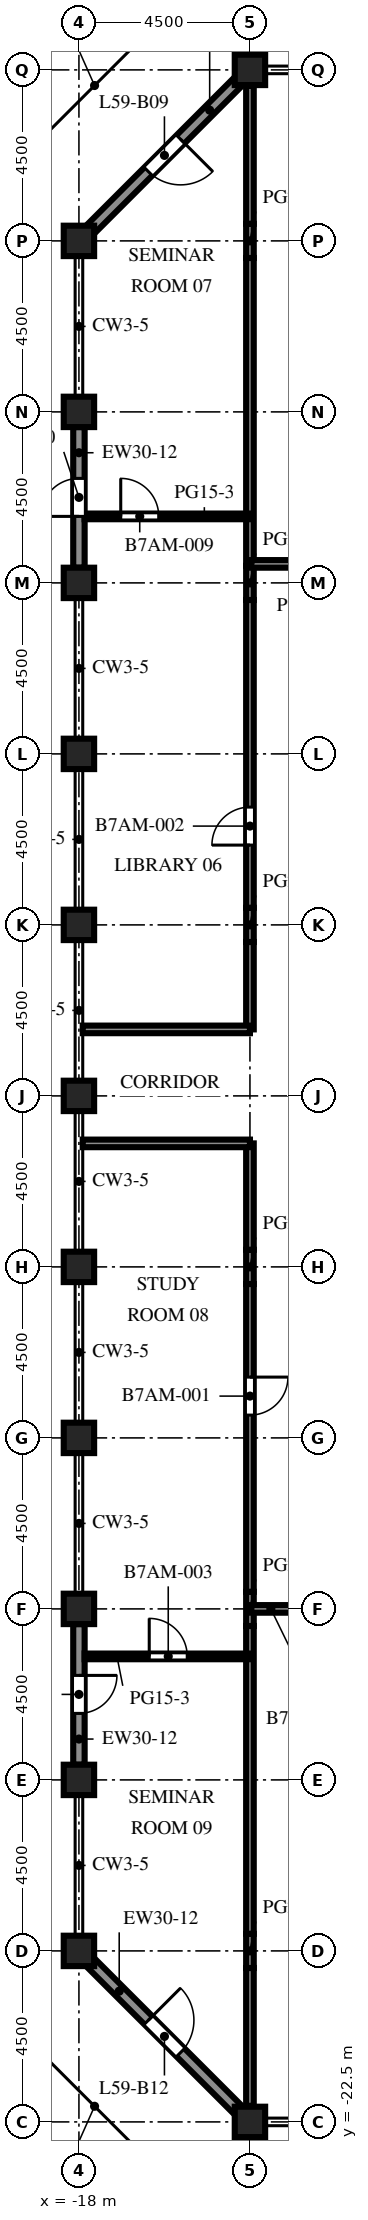
"""IFC4 building model, lengths in metres.
Left out: names, types, materials, properties, quantities, classifications, styles, units other than length and angle.
Written with IfcOpenShell. Run it as: python <this file> out.ifc"""

import sys

from ifc_helpers import new_model, si_unit, direction, frame, frame_2d, origin, origin_2d, place, context, subcontext, project, spatial, rectangle, extrude, element, fill, save


model = new_model("IFC4")
c1 = context("Model", 3, precision=1e-05, world=origin(), true_north=direction((0.0, 1.0)))
c2 = subcontext(c1, "Body", "Model", "MODEL_VIEW")
j1 = project(units=[si_unit("LENGTHUNIT", "METRE"), si_unit("PLANEANGLEUNIT", "RADIAN")], contexts=[c1])
p1 = place(None, origin())
s1 = spatial("IfcSite", under=j1, at=p1, CompositionType="ELEMENT")
p2 = place(p1, origin())
s2 = spatial("IfcBuilding", under=s1, at=p2, CompositionType="ELEMENT")
p3 = place(p2, frame((0.0, 0.0, 260.3)))
s3 = spatial("IfcBuildingStorey", under=s2, at=p3, CompositionType="ELEMENT", Elevation=260.3)
p4 = place(p3, frame((-18.0, -18.0, 0.0), z_axis=(0.0, 0.0, 1.0), x_axis=(1.0, 0.0, 0.0)))
e1 = element("IfcColumn", 1, at=p4, inside=s3, PredefinedType="COLUMN", context=c2, shape_type="SweptSolid", body=[
    extrude(rectangle(XDim=0.8, YDim=0.8, at=origin_2d()), origin(), (0.0, 0.0, 1.0), 5.55),
])
p5 = place(p3, frame((-18.0, -13.5, 0.0), z_axis=(0.0, 0.0, 1.0), x_axis=(1.0, 0.0, 0.0)))
e2 = element("IfcColumn", 2, at=p5, inside=s3, PredefinedType="COLUMN", context=c2, shape_type="SweptSolid", body=[
    extrude(rectangle(XDim=0.8, YDim=0.8, at=origin_2d()), origin(), (0.0, 0.0, 1.0), 6.0),
])
p6 = place(p3, frame((-18.0, -9.0, 0.0), z_axis=(0.0, 0.0, 1.0), x_axis=(1.0, 0.0, 0.0)))
e3 = element("IfcColumn", 3, at=p6, inside=s3, PredefinedType="COLUMN", context=c2, shape_type="SweptSolid", body=[
    extrude(rectangle(XDim=0.8, YDim=0.8, at=origin_2d()), origin(), (0.0, 0.0, 1.0), 5.55),
])
p7 = place(p3, frame((-18.0, -4.5, 0.0), z_axis=(0.0, 0.0, 1.0), x_axis=(1.0, 0.0, 0.0)))
e4 = element("IfcColumn", 4, at=p7, inside=s3, PredefinedType="COLUMN", context=c2, shape_type="SweptSolid", body=[
    extrude(rectangle(XDim=0.8, YDim=0.8, at=origin_2d()), origin(), (0.0, 0.0, 1.0), 6.0),
])
p8 = place(p3, frame((-18.0, 0.0, 0.0), z_axis=(0.0, 0.0, 1.0), x_axis=(1.0, 0.0, 0.0)))
e5 = element("IfcColumn", 5, at=p8, inside=s3, PredefinedType="COLUMN", context=c2, shape_type="SweptSolid", body=[
    extrude(rectangle(XDim=0.8, YDim=0.8, at=origin_2d()), origin(), (0.0, 0.0, 1.0), 5.55),
])
p9 = place(p3, frame((-18.0, 4.5, 0.0), z_axis=(0.0, 0.0, 1.0), x_axis=(1.0, 0.0, 0.0)))
e6 = element("IfcColumn", 6, at=p9, inside=s3, PredefinedType="COLUMN", context=c2, shape_type="SweptSolid", body=[
    extrude(rectangle(XDim=0.8, YDim=0.8, at=origin_2d()), origin(), (0.0, 0.0, 1.0), 6.0),
])
p10 = place(p3, frame((-18.0, 9.0, 0.0), z_axis=(0.0, 0.0, 1.0), x_axis=(1.0, 0.0, 0.0)))
e7 = element("IfcColumn", 7, at=p10, inside=s3, PredefinedType="COLUMN", context=c2, shape_type="SweptSolid", body=[
    extrude(rectangle(XDim=0.8, YDim=0.8, at=origin_2d()), origin(), (0.0, 0.0, 1.0), 5.55),
])
p11 = place(p3, frame((-18.0, 13.5, 0.0), z_axis=(0.0, 0.0, 1.0), x_axis=(1.0, 0.0, 0.0)))
e8 = element("IfcColumn", 8, at=p11, inside=s3, PredefinedType="COLUMN", context=c2, shape_type="SweptSolid", body=[
    extrude(rectangle(XDim=0.8, YDim=0.8, at=origin_2d()), origin(), (0.0, 0.0, 1.0), 6.0),
])
p12 = place(p3, frame((-18.0, 18.0, 0.0), z_axis=(0.0, 0.0, 1.0), x_axis=(1.0, 0.0, 0.0)))
e9 = element("IfcColumn", 9, at=p12, inside=s3, PredefinedType="COLUMN", context=c2, shape_type="SweptSolid", body=[
    extrude(rectangle(XDim=0.8, YDim=0.8, at=origin_2d()), origin(), (0.0, 0.0, 1.0), 5.55),
])
p13 = place(p3, frame((-18.0, 22.5, 0.0), z_axis=(0.0, 0.0, 1.0), x_axis=(1.0, 0.0, 0.0)))
e10 = element("IfcColumn", 10, at=p13, inside=s3, PredefinedType="COLUMN", context=c2, shape_type="SweptSolid", body=[
    extrude(rectangle(XDim=0.8, YDim=0.8, at=origin_2d()), origin(), (0.0, 0.0, 1.0), 6.0),
])
p14 = place(p3, frame((-18.0, 27.0, 0.0), z_axis=(0.0, 0.0, 1.0), x_axis=(1.0, 0.0, 0.0)))
e11 = element("IfcColumn", 11, at=p14, inside=s3, PredefinedType="COLUMN", context=c2, shape_type="SweptSolid", body=[
    extrude(rectangle(XDim=0.8, YDim=0.8, at=origin_2d()), origin(), (0.0, 0.0, 1.0), 5.55),
])
for number, where, z_axis, x_axis in (
    (12, (-13.5, -22.5, 0.0), (0.0, 0.0, 1.0), (1.0, 0.0, 0.0)),
    (13, (-13.5, 31.5, 0.0), (0.0, 0.0, 1.0), (1.0, 0.0, 0.0)),
):
    element("IfcColumn", number, at=place(p3, frame(where, z_axis=z_axis, x_axis=x_axis)), inside=s3, PredefinedType="COLUMN", context=c2, shape_type="SweptSolid", body=[
        extrude(rectangle(XDim=0.8, YDim=0.8, at=origin_2d()), origin(), (0.0, 0.0, 1.0), 6.0),
    ])
p15 = place(p3, frame((-17.706, 27.294, 0.0), z_axis=(0.0, 0.0, 1.0), x_axis=(0.707106781187, 0.707106781187, 0.0)))
e14 = element("IfcWall", 14, at=p15, inside=s3, PredefinedType="SOLIDWALL", context=c2, shape_type="SweptSolid", body=[
    extrude(rectangle(XDim=5.532, YDim=0.3, at=frame_2d((2.766, 0.0))), origin(), (0.0, 0.0, 1.0), 3.75),
])
p16 = place(p15, frame((2.166, 0.0, 0.0)))
e15 = element("IfcOpeningElement", 15, at=p16, cuts=e14, PredefinedType="OPENING", context=c2, shape_type="SweptSolid", body=[
    extrude(rectangle(XDim=1.2, YDim=2.2, at=frame_2d((0.6, 1.1))), frame((0.0, 0.16, 0.0), z_axis=(0.0, -1.0, 0.0), x_axis=(1.0, 0.0, 0.0)), (0.0, 0.0, 1.0), 0.32),
])
p17 = place(p3, frame((-18.0, 18.4, 0.0), z_axis=(0.0, 0.0, 1.0), x_axis=(0.0, 1.0, 0.0)))
e16 = element("IfcWall", 16, at=p17, inside=s3, PredefinedType="SOLIDWALL", context=c2, shape_type="SweptSolid", body=[
    extrude(rectangle(XDim=3.7, YDim=0.3, at=frame_2d((1.85, 0.0))), origin(), (0.0, 0.0, 1.0), 3.75),
])
p18 = place(p17, frame((1.35, 0.0, 0.0)))
e17 = element("IfcOpeningElement", 17, at=p18, cuts=e16, PredefinedType="OPENING", context=c2, shape_type="SweptSolid", body=[
    extrude(rectangle(XDim=1.0, YDim=2.2, at=frame_2d((0.5, 1.1))), frame((0.0, 0.16, 0.0), z_axis=(0.0, -1.0, 0.0), x_axis=(1.0, 0.0, 0.0)), (0.0, 0.0, 1.0), 0.32),
])
p19 = place(p3, frame((-18.0, -13.1, 0.0), z_axis=(0.0, 0.0, 1.0), x_axis=(0.0, 1.0, 0.0)))
e18 = element("IfcWall", 18, at=p19, inside=s3, PredefinedType="SOLIDWALL", context=c2, shape_type="SweptSolid", body=[
    extrude(rectangle(XDim=3.7, YDim=0.3, at=frame_2d((1.85, 0.0))), origin(), (0.0, 0.0, 1.0), 3.75),
])
p20 = place(p19, frame((1.35, 0.0, 0.0)))
e19 = element("IfcOpeningElement", 19, at=p20, cuts=e18, PredefinedType="OPENING", context=c2, shape_type="SweptSolid", body=[
    extrude(rectangle(XDim=1.0, YDim=2.2, at=frame_2d((0.5, 1.1))), frame((0.0, 0.16, 0.0), z_axis=(0.0, -1.0, 0.0), x_axis=(1.0, 0.0, 0.0)), (0.0, 0.0, 1.0), 0.32),
])
p21 = place(p3, frame((-13.794, -22.206, 0.0), z_axis=(0.0, 0.0, 1.0), x_axis=(-0.707106781187, 0.707106781187, 0.0)))
e20 = element("IfcWall", 20, at=p21, inside=s3, PredefinedType="SOLIDWALL", context=c2, shape_type="SweptSolid", body=[
    extrude(rectangle(XDim=5.532, YDim=0.3, at=frame_2d((2.766, 0.0))), origin(), (0.0, 0.0, 1.0), 3.75),
])
p22 = place(p21, frame((2.166, 0.0, 0.0)))
e21 = element("IfcOpeningElement", 21, at=p22, cuts=e20, PredefinedType="OPENING", context=c2, shape_type="SweptSolid", body=[
    extrude(rectangle(XDim=1.2, YDim=2.2, at=frame_2d((0.6, 1.1))), frame((0.0, 0.16, 0.0), z_axis=(0.0, -1.0, 0.0), x_axis=(1.0, 0.0, 0.0)), (0.0, 0.0, 1.0), 0.32),
])
p23 = place(p3, frame((-13.5, -22.077, 0.0), z_axis=(0.0, 0.0, 1.0), x_axis=(0.0, 1.0, 0.0)))
e22 = element("IfcWall", 22, at=p23, inside=s3, PredefinedType="PARTITIONING", context=c2, shape_type="SweptSolid", body=[
    extrude(rectangle(XDim=3.627, YDim=0.2, at=frame_2d((1.813, 0.0))), origin(), (0.0, 0.0, 1.0), 5.55),
])
p24 = place(p3, frame((-13.5, -18.45, 0.0), z_axis=(0.0, 0.0, 1.0), x_axis=(0.0, 1.0, 0.0)))
e23 = element("IfcWall", 23, at=p24, inside=s3, PredefinedType="PARTITIONING", context=c2, shape_type="SweptSolid", body=[
    extrude(rectangle(XDim=0.9, YDim=0.2, at=frame_2d((0.45, 0.0))), origin(), (0.0, 0.0, 1.0), 3.72),
])
p25 = place(p3, frame((-13.5, -17.55, 0.0), z_axis=(0.0, 0.0, 1.0), x_axis=(0.0, 1.0, 0.0)))
e24 = element("IfcWall", 24, at=p25, inside=s3, PredefinedType="PARTITIONING", context=c2, shape_type="SweptSolid", body=[
    extrude(rectangle(XDim=8.1, YDim=0.2, at=frame_2d((4.05, 0.0))), origin(), (0.0, 0.0, 1.0), 5.55),
])
p26 = place(p3, frame((-13.5, -9.45, 0.0), z_axis=(0.0, 0.0, 1.0), x_axis=(0.0, 1.0, 0.0)))
e25 = element("IfcWall", 25, at=p26, inside=s3, PredefinedType="PARTITIONING", context=c2, shape_type="SweptSolid", body=[
    extrude(rectangle(XDim=0.9, YDim=0.2, at=frame_2d((0.45, 0.0))), origin(), (0.0, 0.0, 1.0), 3.72),
])
p27 = place(p3, frame((-13.5, -8.55, 0.0), z_axis=(0.0, 0.0, 1.0), x_axis=(0.0, 1.0, 0.0)))
e26 = element("IfcWall", 26, at=p27, inside=s3, PredefinedType="PARTITIONING", context=c2, shape_type="SweptSolid", body=[
    extrude(rectangle(XDim=8.1, YDim=0.2, at=frame_2d((4.05, 0.0))), origin(), (0.0, 0.0, 1.0), 5.55),
])
p28 = place(p27, frame((4.65, 0.0, 0.0)))
e27 = element("IfcOpeningElement", 27, at=p28, cuts=e26, PredefinedType="OPENING", context=c2, shape_type="SweptSolid", body=[
    extrude(rectangle(XDim=1.0, YDim=2.1, at=frame_2d((0.5, 1.05))), frame((0.0, 0.11, 0.0), z_axis=(0.0, -1.0, 0.0), x_axis=(1.0, 0.0, 0.0)), (0.0, 0.0, 1.0), 0.22),
])
p29 = place(p3, frame((-13.5, -0.45, 0.0), z_axis=(0.0, 0.0, 1.0), x_axis=(0.0, 1.0, 0.0)))
e28 = element("IfcWall", 28, at=p29, inside=s3, PredefinedType="PARTITIONING", context=c2, shape_type="SweptSolid", body=[
    extrude(rectangle(XDim=0.9, YDim=0.2, at=frame_2d((0.45, 0.0))), origin(), (0.0, 0.0, 1.0), 3.72),
])
p30 = place(p3, frame((-13.5, 0.45, 0.0), z_axis=(0.0, 0.0, 1.0), x_axis=(0.0, 1.0, 0.0)))
e29 = element("IfcWall", 29, at=p30, inside=s3, PredefinedType="PARTITIONING", context=c2, shape_type="SweptSolid", body=[
    extrude(rectangle(XDim=2.8, YDim=0.2, at=frame_2d((1.4, 0.0))), origin(), (0.0, 0.0, 1.0), 5.55),
])
p31 = place(p3, frame((-13.5, 6.25, 0.0), z_axis=(0.0, 0.0, 1.0), x_axis=(0.0, 1.0, 0.0)))
e30 = element("IfcWall", 30, at=p31, inside=s3, PredefinedType="PARTITIONING", context=c2, shape_type="SweptSolid", body=[
    extrude(rectangle(XDim=2.3, YDim=0.2, at=frame_2d((1.15, 0.0))), origin(), (0.0, 0.0, 1.0), 5.55),
])
p32 = place(p3, frame((-13.5, 8.55, 0.0), z_axis=(0.0, 0.0, 1.0), x_axis=(0.0, 1.0, 0.0)))
e31 = element("IfcWall", 31, at=p32, inside=s3, PredefinedType="PARTITIONING", context=c2, shape_type="SweptSolid", body=[
    extrude(rectangle(XDim=0.9, YDim=0.2, at=frame_2d((0.45, 0.0))), origin(), (0.0, 0.0, 1.0), 3.72),
])
p33 = place(p3, frame((-13.5, 9.45, 0.0), z_axis=(0.0, 0.0, 1.0), x_axis=(0.0, 1.0, 0.0)))
e32 = element("IfcWall", 32, at=p33, inside=s3, PredefinedType="PARTITIONING", context=c2, shape_type="SweptSolid", body=[
    extrude(rectangle(XDim=8.1, YDim=0.2, at=frame_2d((4.05, 0.0))), origin(), (0.0, 0.0, 1.0), 5.55),
])
p34 = place(p33, frame((1.65, 0.0, 0.0)))
e33 = element("IfcOpeningElement", 33, at=p34, cuts=e32, PredefinedType="OPENING", context=c2, shape_type="SweptSolid", body=[
    extrude(rectangle(XDim=1.0, YDim=2.1, at=frame_2d((0.5, 1.05))), frame((0.0, 0.11, 0.0), z_axis=(0.0, -1.0, 0.0), x_axis=(1.0, 0.0, 0.0)), (0.0, 0.0, 1.0), 0.22),
])
p35 = place(p3, frame((-13.5, 17.55, 0.0), z_axis=(0.0, 0.0, 1.0), x_axis=(0.0, 1.0, 0.0)))
e34 = element("IfcWall", 34, at=p35, inside=s3, PredefinedType="PARTITIONING", context=c2, shape_type="SweptSolid", body=[
    extrude(rectangle(XDim=0.9, YDim=0.2, at=frame_2d((0.45, 0.0))), origin(), (0.0, 0.0, 1.0), 3.72),
])
p36 = place(p3, frame((-13.5, 18.45, 0.0), z_axis=(0.0, 0.0, 1.0), x_axis=(0.0, 1.0, 0.0)))
e35 = element("IfcWall", 35, at=p36, inside=s3, PredefinedType="PARTITIONING", context=c2, shape_type="SweptSolid", body=[
    extrude(rectangle(XDim=8.1, YDim=0.2, at=frame_2d((4.05, 0.0))), origin(), (0.0, 0.0, 1.0), 5.55),
])
p37 = place(p3, frame((-13.5, 26.55, 0.0), z_axis=(0.0, 0.0, 1.0), x_axis=(0.0, 1.0, 0.0)))
e36 = element("IfcWall", 36, at=p37, inside=s3, PredefinedType="PARTITIONING", context=c2, shape_type="SweptSolid", body=[
    extrude(rectangle(XDim=0.9, YDim=0.2, at=frame_2d((0.45, 0.0))), origin(), (0.0, 0.0, 1.0), 3.72),
])
p38 = place(p3, frame((-13.5, 27.45, 0.0), z_axis=(0.0, 0.0, 1.0), x_axis=(0.0, 1.0, 0.0)))
e37 = element("IfcWall", 37, at=p38, inside=s3, PredefinedType="PARTITIONING", context=c2, shape_type="SweptSolid", body=[
    extrude(rectangle(XDim=3.627, YDim=0.2, at=frame_2d((1.813, 0.0))), origin(), (0.0, 0.0, 1.0), 5.55),
])
p39 = place(p3, frame((-13.5, -10.25, 0.0), z_axis=(0.0, 0.0, 1.0), x_axis=(-1.0, 0.0, 0.0)))
e38 = element("IfcWall", 38, at=p39, inside=s3, PredefinedType="PARTITIONING", context=c2, shape_type="SweptSolid", body=[
    extrude(rectangle(XDim=4.35, YDim=0.15, at=frame_2d((2.175, 0.0))), origin(), (0.0, 0.0, 1.0), 5.55),
])
p40 = place(p39, frame((1.65, 0.0, 0.0)))
e39 = element("IfcOpeningElement", 39, at=p40, cuts=e38, PredefinedType="OPENING", context=c2, shape_type="SweptSolid", body=[
    extrude(rectangle(XDim=1.0, YDim=2.1, at=frame_2d((0.5, 1.05))), frame((0.0, 0.085, 0.0), z_axis=(0.0, -1.0, 0.0), x_axis=(1.0, 0.0, 0.0)), (0.0, 0.0, 1.0), 0.17),
])
p41 = place(p3, frame((-10.5, -9.0, 0.0), z_axis=(0.0, 0.0, 1.0), x_axis=(-1.0, 0.0, 0.0)))
e40 = element("IfcWall", 40, at=p41, inside=s3, PredefinedType="PARTITIONING", context=c2, shape_type="SweptSolid", body=[
    extrude(rectangle(XDim=3.0, YDim=0.2, at=frame_2d((1.5, 0.0))), origin(), (0.0, 0.0, 1.0), 3.72),
])
p42 = place(p41, frame((0.9, 0.0, 0.0)))
e41 = element("IfcOpeningElement", 41, at=p42, cuts=e40, PredefinedType="OPENING", context=c2, shape_type="SweptSolid", body=[
    extrude(rectangle(XDim=1.0, YDim=2.1, at=frame_2d((0.5, 1.05))), frame((0.0, 0.11, 0.0), z_axis=(0.0, -1.0, 0.0), x_axis=(1.0, 0.0, 0.0)), (0.0, 0.0, 1.0), 0.22),
])
for number, where, z_axis, x_axis in (
    (42, (-17.9, 3.25, 0.0), (0.0, 0.0, 1.0), (1.0, 0.0, 0.0)),
    (43, (-17.9, 6.25, 0.0), (0.0, 0.0, 1.0), (1.0, 0.0, 0.0)),
):
    element("IfcWall", number, at=place(p3, frame(where, z_axis=z_axis, x_axis=x_axis)), inside=s3, PredefinedType="PARTITIONING", context=c2, shape_type="SweptSolid", body=[
        extrude(rectangle(XDim=4.4, YDim=0.2, at=frame_2d((2.2, 0.0))), origin(), (0.0, 0.0, 1.0), 5.55),
    ])
p43 = place(p3, frame((-13.5, 18.5, 0.0), z_axis=(0.0, 0.0, 1.0), x_axis=(1.0, 0.0, 0.0)))
e44 = element("IfcWall", 44, at=p43, inside=s3, PredefinedType="PARTITIONING", context=c2, shape_type="SweptSolid", body=[
    extrude(rectangle(XDim=3.0, YDim=0.2, at=frame_2d((1.5, 0.0))), origin(), (0.0, 0.0, 1.0), 3.72),
])
p44 = place(p3, frame((-17.85, 19.75, 0.0), z_axis=(0.0, 0.0, 1.0), x_axis=(1.0, 0.0, 0.0)))
e45 = element("IfcWall", 45, at=p44, inside=s3, PredefinedType="PARTITIONING", context=c2, shape_type="SweptSolid", body=[
    extrude(rectangle(XDim=4.35, YDim=0.15, at=frame_2d((2.175, 0.0))), origin(), (0.0, 0.0, 1.0), 5.55),
])
p45 = place(p44, frame((0.95, 0.0, 0.0)))
e46 = element("IfcOpeningElement", 46, at=p45, cuts=e45, PredefinedType="OPENING", context=c2, shape_type="SweptSolid", body=[
    extrude(rectangle(XDim=1.0, YDim=2.1, at=frame_2d((0.5, 1.05))), frame((0.0, 0.085, 0.0), z_axis=(0.0, -1.0, 0.0), x_axis=(1.0, 0.0, 0.0)), (0.0, 0.0, 1.0), 0.17),
])
p46 = place(p16, origin())
e47 = element("IfcDoor", 47, at=p46, inside=s3, OperationType="SINGLE_SWING_RIGHT", PredefinedType="DOOR", context=c2, shape_type="SweptSolid", body=[
    extrude(rectangle(XDim=1.2, YDim=2.2, at=frame_2d((0.6, 1.1))), frame((0.0, 0.025, 0.0), z_axis=(0.0, -1.0, 0.0), x_axis=(1.0, 0.0, 0.0)), (0.0, 0.0, 1.0), 0.05),
])
fill(e15, e47)
p47 = place(p18, origin())
e48 = element("IfcDoor", 48, at=p47, inside=s3, OperationType="SINGLE_SWING_LEFT", PredefinedType="DOOR", context=c2, shape_type="SweptSolid", body=[
    extrude(rectangle(XDim=1.0, YDim=2.2, at=frame_2d((0.5, 1.1))), frame((0.0, 0.025, 0.0), z_axis=(0.0, -1.0, 0.0), x_axis=(1.0, 0.0, 0.0)), (0.0, 0.0, 1.0), 0.05),
])
fill(e17, e48)
p48 = place(p20, origin())
e49 = element("IfcDoor", 49, at=p48, inside=s3, OperationType="SINGLE_SWING_RIGHT", PredefinedType="DOOR", context=c2, shape_type="SweptSolid", body=[
    extrude(rectangle(XDim=1.0, YDim=2.2, at=frame_2d((0.5, 1.1))), frame((0.0, 0.025, 0.0), z_axis=(0.0, -1.0, 0.0), x_axis=(1.0, 0.0, 0.0)), (0.0, 0.0, 1.0), 0.05),
])
fill(e19, e49)
p49 = place(p22, origin())
e50 = element("IfcDoor", 50, at=p49, inside=s3, OperationType="SINGLE_SWING_RIGHT", PredefinedType="DOOR", context=c2, shape_type="SweptSolid", body=[
    extrude(rectangle(XDim=1.2, YDim=2.2, at=frame_2d((0.6, 1.1))), frame((0.0, 0.025, 0.0), z_axis=(0.0, -1.0, 0.0), x_axis=(1.0, 0.0, 0.0)), (0.0, 0.0, 1.0), 0.05),
])
fill(e21, e50)
p50 = place(p28, origin())
e51 = element("IfcDoor", 51, at=p50, inside=s3, OperationType="SINGLE_SWING_RIGHT", PredefinedType="DOOR", context=c2, shape_type="SweptSolid", body=[
    extrude(rectangle(XDim=1.0, YDim=2.1, at=frame_2d((0.5, 1.05))), frame((0.0, 0.025, 0.0), z_axis=(0.0, -1.0, 0.0), x_axis=(1.0, 0.0, 0.0)), (0.0, 0.0, 1.0), 0.05),
])
fill(e27, e51)
p51 = place(p34, origin())
e52 = element("IfcDoor", 52, at=p51, inside=s3, OperationType="SINGLE_SWING_LEFT", PredefinedType="DOOR", context=c2, shape_type="SweptSolid", body=[
    extrude(rectangle(XDim=1.0, YDim=2.1, at=frame_2d((0.5, 1.05))), frame((0.0, 0.025, 0.0), z_axis=(0.0, -1.0, 0.0), x_axis=(1.0, 0.0, 0.0)), (0.0, 0.0, 1.0), 0.05),
])
fill(e33, e52)
p52 = place(p40, origin())
e53 = element("IfcDoor", 53, at=p52, inside=s3, OperationType="SINGLE_SWING_RIGHT", PredefinedType="DOOR", context=c2, shape_type="SweptSolid", body=[
    extrude(rectangle(XDim=1.0, YDim=2.1, at=frame_2d((0.5, 1.05))), frame((0.0, 0.025, 0.0), z_axis=(0.0, -1.0, 0.0), x_axis=(1.0, 0.0, 0.0)), (0.0, 0.0, 1.0), 0.05),
])
fill(e39, e53)
p53 = place(p45, origin())
e54 = element("IfcDoor", 54, at=p53, inside=s3, OperationType="SINGLE_SWING_LEFT", PredefinedType="DOOR", context=c2, shape_type="SweptSolid", body=[
    extrude(rectangle(XDim=1.0, YDim=2.1, at=frame_2d((0.5, 1.05))), frame((0.0, 0.025, 0.0), z_axis=(0.0, -1.0, 0.0), x_axis=(1.0, 0.0, 0.0)), (0.0, 0.0, 1.0), 0.05),
])
fill(e46, e54)
save(model, sys.argv[1])
